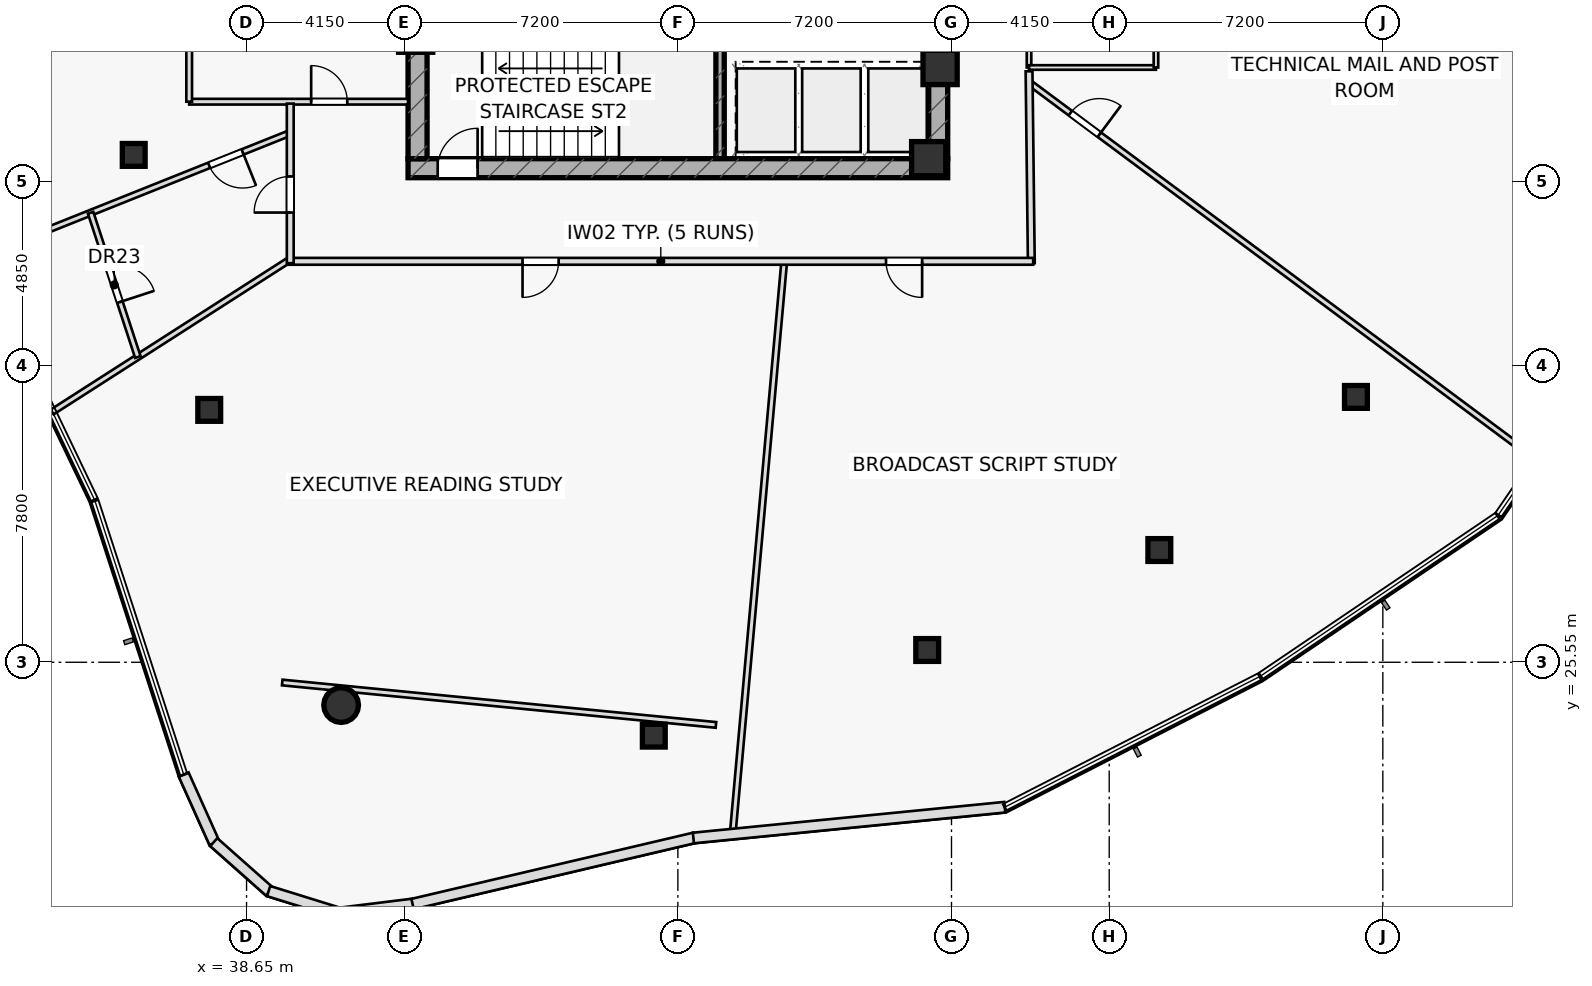
"""IFC4 building model, lengths in metres.
Left out: names, types, materials, properties, quantities, classifications, styles, units other than length and angle.
Written with IfcOpenShell. Run it as: python <this file> out.ifc"""

import sys

from ifc_helpers import new_model, si_unit, direction, frame, frame_2d, origin, origin_2d, place, context, subcontext, project, spatial, rectangle, hollow_rectangle, hollow_circle, extrude, element, fill, save


model = new_model("IFC4")
c1 = context("Model", 3, precision=1e-05, world=origin(), true_north=direction((0.0, 1.0)))
c2 = subcontext(c1, "Body", "Model", "MODEL_VIEW")
j1 = project(units=[si_unit("LENGTHUNIT", "METRE"), si_unit("PLANEANGLEUNIT", "RADIAN")], contexts=[c1])
p1 = place(None, origin())
s1 = spatial("IfcSite", under=j1, at=p1, CompositionType="ELEMENT")
p2 = place(p1, origin())
s2 = spatial("IfcBuilding", under=s1, at=p2, CompositionType="ELEMENT")
p3 = place(p2, frame((0.0, 0.0, 161.8)))
s3 = spatial("IfcBuildingStorey", under=s2, at=p3, CompositionType="ELEMENT", Elevation=161.8)
p4 = place(p3, frame((51.11, 38.8, 0.0), z_axis=(0.0, 0.0, 1.0), x_axis=(0.0, 1.0, 0.0)))
e1 = element("IfcWall", 1, at=p4, inside=s3, PredefinedType="SHEAR", context=c2, shape_type="SweptSolid", body=[
    extrude(rectangle(XDim=3.1, YDim=0.22, at=frame_2d((1.55, 0.0))), origin(), (0.0, 0.0, 1.0), 3.55),
])
p5 = place(p3, frame((42.9, 38.55, 0.0), z_axis=(0.0, 0.0, 1.0), x_axis=(1.0, 0.0, 0.0)))
e2 = element("IfcWall", 2, at=p5, inside=s3, PredefinedType="SHEAR", context=c2, shape_type="SweptSolid", body=[
    extrude(rectangle(XDim=14.2, YDim=0.5, at=frame_2d((7.1, 0.0))), origin(), (0.0, 0.0, 1.0), 3.55),
])
p6 = place(p5, frame((0.78, 0.0, 0.0)))
e3 = element("IfcOpeningElement", 3, at=p6, cuts=e2, PredefinedType="OPENING", context=c2, shape_type="SweptSolid", body=[
    extrude(rectangle(XDim=1.05, YDim=2.2, at=frame_2d((0.525, 1.1))), frame((0.0, 0.26, 0.0), z_axis=(0.0, -1.0, 0.0), x_axis=(1.0, 0.0, 0.0)), (0.0, 0.0, 1.0), 0.52),
])
p7 = place(p3, frame((43.15, 38.8, 0.0), z_axis=(0.0, 0.0, 1.0), x_axis=(0.0, 1.0, 0.0)))
e4 = element("IfcWall", 4, at=p7, inside=s3, PredefinedType="SHEAR", context=c2, shape_type="SweptSolid", body=[
    extrude(rectangle(XDim=12.4, YDim=0.5, at=frame_2d((6.2, 0.0))), origin(), (0.0, 0.0, 1.0), 3.55),
])
p8 = place(p3, frame((56.85, 38.8, 0.0), z_axis=(0.0, 0.0, 1.0), x_axis=(0.0, 1.0, 0.0)))
e5 = element("IfcWall", 5, at=p8, inside=s3, PredefinedType="SHEAR", context=c2, shape_type="SweptSolid", body=[
    extrude(rectangle(XDim=12.4, YDim=0.5, at=frame_2d((6.2, 0.0))), origin(), (0.0, 0.0, 1.0), 3.55),
])
p9 = place(p8, frame((3.85, 0.0, 0.0)))
e6 = element("IfcOpeningElement", 6, at=p9, cuts=e5, PredefinedType="OPENING", context=c2, shape_type="SweptSolid", body=[
    extrude(rectangle(XDim=1.5, YDim=2.2, at=frame_2d((0.75, 1.1))), frame((0.0, 0.26, 0.0), z_axis=(0.0, -1.0, 0.0), x_axis=(1.0, 0.0, 0.0)), (0.0, 0.0, 1.0), 0.52),
])
for number, where, z_axis, x_axis in (
    (7, (43.1, 42.05, 0.0), (0.0, 0.0, 1.0), (1.0, 0.0, 0.0)),
    (8, (56.9, 41.2, 0.0), (0.0, 0.0, 1.0), (1.0, 0.0, 0.0)),
    (9, (56.6, 38.8, 0.0), (0.0, 0.0, 1.0), (1.0, 0.0, 0.0)),
):
    element("IfcColumn", number, at=place(p3, frame(where, z_axis=z_axis, x_axis=x_axis)), inside=s3, PredefinedType="COLUMN", context=c2, shape_type="SweptSolid", body=[
        extrude(rectangle(XDim=0.9, YDim=0.9, at=origin_2d()), origin(), (0.0, 0.0, 1.0), 3.55),
    ])
for number, where, z_axis, x_axis in (
    (10, (35.681, 38.9, 0.0), (0.0, 0.0, 1.0), (1.0, 0.0, 0.0)),
    (11, (37.668, 32.19, 0.0), (0.0, 0.0, 1.0), (1.0, 0.0, 0.0)),
):
    element("IfcColumn", number, at=place(p3, frame(where, z_axis=z_axis, x_axis=x_axis)), inside=s3, PredefinedType="COLUMN", context=c2, shape_type="SweptSolid", body=[
        extrude(hollow_rectangle(XDim=0.6, YDim=0.6, WallThickness=0.036, at=origin_2d()), origin(), (0.0, 0.0, 1.0), 3.55),
    ])
p10 = place(p3, frame((41.139, 24.424, 0.0), z_axis=(0.0, 0.0, 1.0), x_axis=(1.0, 0.0, 0.0)))
e12 = element("IfcColumn", 12, at=p10, inside=s3, PredefinedType="COLUMN", context=c2, shape_type="SweptSolid", body=[
    extrude(hollow_circle(Radius=0.457, WallThickness=0.04, at=origin_2d()), origin(), (0.0, 0.0, 1.0), 3.55),
])
for number, where, z_axis, x_axis in (
    (13, (49.366, 23.619, 0.0), (0.0, 0.0, 1.0), (1.0, 0.0, 0.0)),
    (14, (56.561, 25.873, 0.0), (0.0, 0.0, 1.0), (1.0, 0.0, 0.0)),
    (15, (62.669, 28.503, 0.0), (0.0, 0.0, 1.0), (1.0, 0.0, 0.0)),
    (16, (67.842, 32.532, 0.0), (0.0, 0.0, 1.0), (1.0, 0.0, 0.0)),
):
    element("IfcColumn", number, at=place(p3, frame(where, z_axis=z_axis, x_axis=x_axis)), inside=s3, PredefinedType="COLUMN", context=c2, shape_type="SweptSolid", body=[
        extrude(hollow_rectangle(XDim=0.6, YDim=0.6, WallThickness=0.036, at=origin_2d()), origin(), (0.0, 0.0, 1.0), 3.55),
    ])
p11 = place(p3, frame((39.589, 25.018, 0.0), z_axis=(0.0, 0.0, 1.0), x_axis=(0.99524905582, -0.097361783517, 0.0)))
e17 = element("IfcWall", 17, at=p11, inside=s3, PredefinedType="PARTITIONING", context=c2, shape_type="SweptSolid", body=[
    extrude(rectangle(XDim=11.467, YDim=0.15, at=frame_2d((5.733, 0.0))), origin(), (0.0, 0.0, 1.0), 2.935),
])
p12 = place(p3, frame((37.14, 40.3, 0.0), z_axis=(0.0, 0.0, 1.0), x_axis=(1.0, 0.0, 0.0)))
e18 = element("IfcWall", 18, at=p12, inside=s3, PredefinedType="PARTITIONING", context=c2, shape_type="SweptSolid", body=[
    extrude(rectangle(XDim=5.76, YDim=0.15, at=frame_2d((2.88, 0.0))), origin(), (0.0, 0.0, 1.0), 3.55),
])
p13 = place(p12, frame((3.21, 0.0, 0.0)))
e19 = element("IfcOpeningElement", 19, at=p13, cuts=e18, PredefinedType="OPENING", context=c2, shape_type="SweptSolid", body=[
    extrude(rectangle(XDim=0.95, YDim=2.05, at=frame_2d((0.475, 1.025))), frame((0.0, 0.085, 0.0), z_axis=(0.0, -1.0, 0.0), x_axis=(1.0, 0.0, 0.0)), (0.0, 0.0, 1.0), 0.17),
])
p14 = place(p3, frame((37.14, 40.3, 0.0), z_axis=(0.0, 0.0, 1.0), x_axis=(0.0, 1.0, 0.0)))
e20 = element("IfcWall", 20, at=p14, inside=s3, PredefinedType="PARTITIONING", context=c2, shape_type="SweptSolid", body=[
    extrude(rectangle(XDim=7.58, YDim=0.15, at=frame_2d((3.79, 0.0))), origin(), (0.0, 0.0, 1.0), 2.935),
])
p15 = place(p3, frame((59.24, 41.2, 0.0), z_axis=(0.0, 0.0, 1.0), x_axis=(0.0, 1.0, 0.0)))
e21 = element("IfcWall", 21, at=p15, inside=s3, PredefinedType="PARTITIONING", context=c2, shape_type="SweptSolid", body=[
    extrude(rectangle(XDim=7.0, YDim=0.12, at=frame_2d((3.5, 0.0))), origin(), (0.0, 0.0, 1.0), 3.55),
])
p16 = place(p15, frame((1.15, 0.0, 0.0)))
e22 = element("IfcOpeningElement", 22, at=p16, cuts=e21, PredefinedType="OPENING", context=c2, shape_type="SweptSolid", body=[
    extrude(rectangle(XDim=0.9, YDim=2.05, at=frame_2d((0.45, 1.025))), frame((0.0, 0.07, 0.0), z_axis=(0.0, -1.0, 0.0), x_axis=(1.0, 0.0, 0.0)), (0.0, 0.0, 1.0), 0.14),
])
p17 = place(p15, frame((4.7, 0.0, 0.0)))
e23 = element("IfcOpeningElement", 23, at=p17, cuts=e21, PredefinedType="OPENING", context=c2, shape_type="SweptSolid", body=[
    extrude(rectangle(XDim=0.9, YDim=2.05, at=frame_2d((0.45, 1.025))), frame((0.0, 0.07, 0.0), z_axis=(0.0, -1.0, 0.0), x_axis=(1.0, 0.0, 0.0)), (0.0, 0.0, 1.0), 0.14),
])
p18 = place(p3, frame((59.24, 41.2, 0.0), z_axis=(0.0, 0.0, 1.0), x_axis=(1.0, 0.0, 0.0)))
e24 = element("IfcWall", 24, at=p18, inside=s3, PredefinedType="PARTITIONING", context=c2, shape_type="SweptSolid", body=[
    extrude(rectangle(XDim=3.34, YDim=0.12, at=frame_2d((1.67, 0.0))), origin(), (0.0, 0.0, 1.0), 3.55),
])
p19 = place(p3, frame((62.58, 41.2, 0.0), z_axis=(0.0, 0.0, 1.0), x_axis=(0.0, 1.0, 0.0)))
e25 = element("IfcWall", 25, at=p19, inside=s3, PredefinedType="PARTITIONING", context=c2, shape_type="SweptSolid", body=[
    extrude(rectangle(XDim=7.0, YDim=0.12, at=frame_2d((3.5, 0.0))), origin(), (0.0, 0.0, 1.0), 3.55),
])
p20 = place(p3, frame((39.8, 39.479, 0.0), z_axis=(0.0, 0.0, 1.0), x_axis=(-0.928461453954, -0.371428766416, 0.0)))
e26 = element("IfcWall", 26, at=p20, inside=s3, PredefinedType="PARTITIONING", context=c2, shape_type="SweptSolid", body=[
    extrude(rectangle(XDim=8.841, YDim=0.15, at=frame_2d((4.42, 0.0))), origin(), (0.0, 0.0, 1.0), 2.935),
])
p21 = place(p20, frame((1.35, 0.0, 0.0)))
e27 = element("IfcOpeningElement", 27, at=p21, cuts=e26, PredefinedType="OPENING", context=c2, shape_type="SweptSolid", body=[
    extrude(rectangle(XDim=0.95, YDim=2.05, at=frame_2d((0.475, 1.025))), frame((0.0, 0.085, 0.0), z_axis=(0.0, -1.0, 0.0), x_axis=(1.0, 0.0, 0.0)), (0.0, 0.0, 1.0), 0.17),
])
p22 = place(p3, frame((39.8, 36.152, 0.0), z_axis=(0.0, 0.0, 1.0), x_axis=(-0.841822586313, -0.539754326683, 0.0)))
e28 = element("IfcWall", 28, at=p22, inside=s3, PredefinedType="PARTITIONING", context=c2, shape_type="SweptSolid", body=[
    extrude(rectangle(XDim=7.444, YDim=0.15, at=frame_2d((3.722, 0.0))), origin(), (0.0, 0.0, 1.0), 3.025),
])
p23 = place(p3, frame((52.799, 36.1, 0.0), z_axis=(0.0, 0.0, 1.0), x_axis=(-0.089657690779, -0.995972639426, 0.0)))
e29 = element("IfcWall", 29, at=p23, inside=s3, PredefinedType="PARTITIONING", context=c2, shape_type="SweptSolid", body=[
    extrude(rectangle(XDim=15.143, YDim=0.15, at=frame_2d((7.571, 0.0))), origin(), (0.0, 0.0, 1.0), 3.025),
])
p24 = place(p3, frame((59.244, 40.804, 0.0), z_axis=(0.0, 0.0, 1.0), x_axis=(0.802525033697, -0.596618446152, 0.0)))
e30 = element("IfcWall", 30, at=p24, inside=s3, PredefinedType="PARTITIONING", context=c2, shape_type="SweptSolid", body=[
    extrude(rectangle(XDim=16.637, YDim=0.15, at=frame_2d((8.319, 0.0))), origin(), (0.0, 0.0, 1.0), 2.935),
])
p25 = place(p24, frame((1.35, 0.0, 0.0)))
e31 = element("IfcOpeningElement", 31, at=p25, cuts=e30, PredefinedType="OPENING", context=c2, shape_type="SweptSolid", body=[
    extrude(rectangle(XDim=0.95, YDim=2.05, at=frame_2d((0.475, 1.025))), frame((0.0, 0.085, 0.0), z_axis=(0.0, -1.0, 0.0), x_axis=(1.0, 0.0, 0.0)), (0.0, 0.0, 1.0), 0.17),
])
p26 = place(p3, frame((34.547, 37.378, 0.0), z_axis=(0.0, 0.0, 1.0), x_axis=(0.311126376448, -0.950368548447, 0.0)))
e32 = element("IfcWall", 32, at=p26, inside=s3, PredefinedType="PARTITIONING", context=c2, shape_type="SweptSolid", body=[
    extrude(rectangle(XDim=3.995, YDim=0.15, at=frame_2d((1.998, 0.0))), origin(), (0.0, 0.0, 1.0), 3.55),
])
p27 = place(p26, frame((1.522, 0.0, 0.0)))
e33 = element("IfcOpeningElement", 33, at=p27, cuts=e32, PredefinedType="OPENING", context=c2, shape_type="SweptSolid", body=[
    extrude(rectangle(XDim=0.95, YDim=2.05, at=frame_2d((0.475, 1.025))), frame((0.0, 0.085, 0.0), z_axis=(0.0, -1.0, 0.0), x_axis=(1.0, 0.0, 0.0)), (0.0, 0.0, 1.0), 0.17),
])
p28 = place(p3, frame((59.24, 41.1, 0.0), z_axis=(0.0, 0.0, 1.0), x_axis=(0.011891834917, -0.999929289631, 0.0)))
e34 = element("IfcWall", 34, at=p28, inside=s3, PredefinedType="PARTITIONING", context=c2, shape_type="SweptSolid", body=[
    extrude(rectangle(XDim=5.05, YDim=0.18, at=frame_2d((2.525, 0.0))), origin(), (0.0, 0.0, 1.0), 2.935),
])
p29 = place(p3, frame((59.35, 36.1, 0.0), z_axis=(0.0, 0.0, 1.0), x_axis=(-1.0, 0.0, 0.0)))
e35 = element("IfcWall", 35, at=p29, inside=s3, PredefinedType="PARTITIONING", context=c2, shape_type="SweptSolid", body=[
    extrude(rectangle(XDim=19.6, YDim=0.18, at=frame_2d((9.8, 0.0))), origin(), (0.0, 0.0, 1.0), 2.935),
])
p30 = place(p29, frame((2.923, 0.0, 0.0)))
e36 = element("IfcOpeningElement", 36, at=p30, cuts=e35, PredefinedType="OPENING", context=c2, shape_type="SweptSolid", body=[
    extrude(rectangle(XDim=0.95, YDim=2.05, at=frame_2d((0.475, 1.025))), frame((0.0, 0.1, 0.0), z_axis=(0.0, -1.0, 0.0), x_axis=(1.0, 0.0, 0.0)), (0.0, 0.0, 1.0), 0.2),
])
p31 = place(p29, frame((12.488, 0.0, 0.0)))
e37 = element("IfcOpeningElement", 37, at=p31, cuts=e35, PredefinedType="OPENING", context=c2, shape_type="SweptSolid", body=[
    extrude(rectangle(XDim=0.95, YDim=2.05, at=frame_2d((0.475, 1.025))), frame((0.0, 0.1, 0.0), z_axis=(0.0, -1.0, 0.0), x_axis=(1.0, 0.0, 0.0)), (0.0, 0.0, 1.0), 0.2),
])
p32 = place(p3, frame((39.8, 36.05, 0.0), z_axis=(0.0, 0.0, 1.0), x_axis=(0.0, 1.0, 0.0)))
e38 = element("IfcWall", 38, at=p32, inside=s3, PredefinedType="PARTITIONING", context=c2, shape_type="SweptSolid", body=[
    extrude(rectangle(XDim=4.2, YDim=0.18, at=frame_2d((2.1, 0.0))), origin(), (0.0, 0.0, 1.0), 2.935),
])
p33 = place(p32, frame((1.333, 0.0, 0.0)))
e39 = element("IfcOpeningElement", 39, at=p33, cuts=e38, PredefinedType="OPENING", context=c2, shape_type="SweptSolid", body=[
    extrude(rectangle(XDim=0.95, YDim=2.05, at=frame_2d((0.475, 1.025))), frame((0.0, 0.1, 0.0), z_axis=(0.0, -1.0, 0.0), x_axis=(1.0, 0.0, 0.0)), (0.0, 0.0, 1.0), 0.2),
])
p34 = place(p3, frame((36.996, 22.595, 0.0), z_axis=(0.0, 0.0, 1.0), x_axis=(0.409141081394, -0.912471136812, 0.0)))
e40 = element("IfcWall", 40, at=p34, inside=s3, PredefinedType="STANDARD", context=c2, shape_type="SweptSolid", body=[
    extrude(rectangle(XDim=1.975, YDim=0.28, at=frame_2d((0.988, 0.0))), origin(), (0.0, 0.0, 1.0), 3.55),
])
p35 = place(p3, frame((37.787, 20.817, 0.0), z_axis=(0.0, 0.0, 1.0), x_axis=(0.748293631721, -0.663367651251, 0.0)))
e41 = element("IfcWall", 41, at=p35, inside=s3, PredefinedType="STANDARD", context=c2, shape_type="SweptSolid", body=[
    extrude(rectangle(XDim=1.963, YDim=0.28, at=frame_2d((0.982, 0.0))), origin(), (0.0, 0.0, 1.0), 3.55),
])
p36 = place(p3, frame((39.231, 19.529, 0.0), z_axis=(0.0, 0.0, 1.0), x_axis=(0.955020433724, -0.296539999275, 0.0)))
e42 = element("IfcWall", 42, at=p36, inside=s3, PredefinedType="STANDARD", context=c2, shape_type="SweptSolid", body=[
    extrude(rectangle(XDim=1.964, YDim=0.28, at=frame_2d((0.982, 0.0))), origin(), (0.0, 0.0, 1.0), 3.55),
])
p37 = place(p3, frame((41.077, 18.949, 0.0), z_axis=(0.0, 0.0, 1.0), x_axis=(0.992432165856, 0.122794121091, 0.0)))
e43 = element("IfcWall", 43, at=p37, inside=s3, PredefinedType="STANDARD", context=c2, shape_type="SweptSolid", body=[
    extrude(rectangle(XDim=1.986, YDim=0.28, at=frame_2d((0.993, 0.0))), origin(), (0.0, 0.0, 1.0), 3.55),
])
p38 = place(p3, frame((43.019, 19.188, 0.0), z_axis=(0.0, 0.0, 1.0), x_axis=(0.97348938317, 0.228732203364, 0.0)))
e44 = element("IfcWall", 44, at=p38, inside=s3, PredefinedType="STANDARD", context=c2, shape_type="SweptSolid", body=[
    extrude(rectangle(XDim=7.621, YDim=0.28, at=frame_2d((3.811, 0.0))), origin(), (0.0, 0.0, 1.0), 3.55),
])
p39 = place(p3, frame((50.408, 20.926, 0.0), z_axis=(0.0, 0.0, 1.0), x_axis=(0.995149277754, 0.098376394458, 0.0)))
e45 = element("IfcWall", 45, at=p39, inside=s3, PredefinedType="STANDARD", context=c2, shape_type="SweptSolid", body=[
    extrude(rectangle(XDim=8.234, YDim=0.28, at=frame_2d((4.117, 0.0))), origin(), (0.0, 0.0, 1.0), 3.55),
])
p40 = place(p6, origin())
e46 = element("IfcDoor", 46, at=p40, inside=s3, OperationType="SINGLE_SWING_RIGHT", PredefinedType="DOOR", context=c2, shape_type="SweptSolid", body=[
    extrude(rectangle(XDim=1.05, YDim=2.2, at=frame_2d((0.525, 1.1))), frame((0.0, 0.025, 0.0), z_axis=(0.0, -1.0, 0.0), x_axis=(1.0, 0.0, 0.0)), (0.0, 0.0, 1.0), 0.05),
])
fill(e3, e46)
p41 = place(p13, origin())
e47 = element("IfcDoor", 47, at=p41, inside=s3, OperationType="SINGLE_SWING_LEFT", PredefinedType="DOOR", context=c2, shape_type="SweptSolid", body=[
    extrude(rectangle(XDim=0.95, YDim=2.05, at=frame_2d((0.475, 1.025))), frame((0.0, 0.025, 0.0), z_axis=(0.0, -1.0, 0.0), x_axis=(1.0, 0.0, 0.0)), (0.0, 0.0, 1.0), 0.05),
])
fill(e19, e47)
p42 = place(p21, origin())
e48 = element("IfcDoor", 48, at=p42, inside=s3, OperationType="SINGLE_SWING_LEFT", PredefinedType="DOOR", context=c2, shape_type="SweptSolid", body=[
    extrude(rectangle(XDim=0.95, YDim=2.05, at=frame_2d((0.475, 1.025))), frame((0.0, 0.025, 0.0), z_axis=(0.0, -1.0, 0.0), x_axis=(1.0, 0.0, 0.0)), (0.0, 0.0, 1.0), 0.05),
])
fill(e27, e48)
p43 = place(p25, origin())
e49 = element("IfcDoor", 49, at=p43, inside=s3, OperationType="SINGLE_SWING_RIGHT", PredefinedType="DOOR", context=c2, shape_type="SweptSolid", body=[
    extrude(rectangle(XDim=0.95, YDim=2.05, at=frame_2d((0.475, 1.025))), frame((0.0, 0.025, 0.0), z_axis=(0.0, -1.0, 0.0), x_axis=(1.0, 0.0, 0.0)), (0.0, 0.0, 1.0), 0.05),
])
fill(e31, e49)
p44 = place(p27, origin())
e50 = element("IfcDoor", 50, at=p44, inside=s3, OperationType="SINGLE_SWING_RIGHT", PredefinedType="DOOR", context=c2, shape_type="SweptSolid", body=[
    extrude(rectangle(XDim=0.95, YDim=2.05, at=frame_2d((0.475, 1.025))), frame((0.0, 0.025, 0.0), z_axis=(0.0, -1.0, 0.0), x_axis=(1.0, 0.0, 0.0)), (0.0, 0.0, 1.0), 0.05),
])
fill(e33, e50)
p45 = place(p30, origin())
e51 = element("IfcDoor", 51, at=p45, inside=s3, OperationType="SINGLE_SWING_LEFT", PredefinedType="DOOR", context=c2, shape_type="SweptSolid", body=[
    extrude(rectangle(XDim=0.95, YDim=2.05, at=frame_2d((0.475, 1.025))), frame((0.0, 0.025, 0.0), z_axis=(0.0, -1.0, 0.0), x_axis=(1.0, 0.0, 0.0)), (0.0, 0.0, 1.0), 0.05),
])
fill(e36, e51)
p46 = place(p31, origin())
e52 = element("IfcDoor", 52, at=p46, inside=s3, OperationType="SINGLE_SWING_RIGHT", PredefinedType="DOOR", context=c2, shape_type="SweptSolid", body=[
    extrude(rectangle(XDim=0.95, YDim=2.05, at=frame_2d((0.475, 1.025))), frame((0.0, 0.025, 0.0), z_axis=(0.0, -1.0, 0.0), x_axis=(1.0, 0.0, 0.0)), (0.0, 0.0, 1.0), 0.05),
])
fill(e37, e52)
p47 = place(p33, origin())
e53 = element("IfcDoor", 53, at=p47, inside=s3, OperationType="SINGLE_SWING_LEFT", PredefinedType="DOOR", context=c2, shape_type="SweptSolid", body=[
    extrude(rectangle(XDim=0.95, YDim=2.05, at=frame_2d((0.475, 1.025))), frame((0.0, 0.025, 0.0), z_axis=(0.0, -1.0, 0.0), x_axis=(1.0, 0.0, 0.0)), (0.0, 0.0, 1.0), 0.05),
])
fill(e39, e53)
save(model, sys.argv[1])
